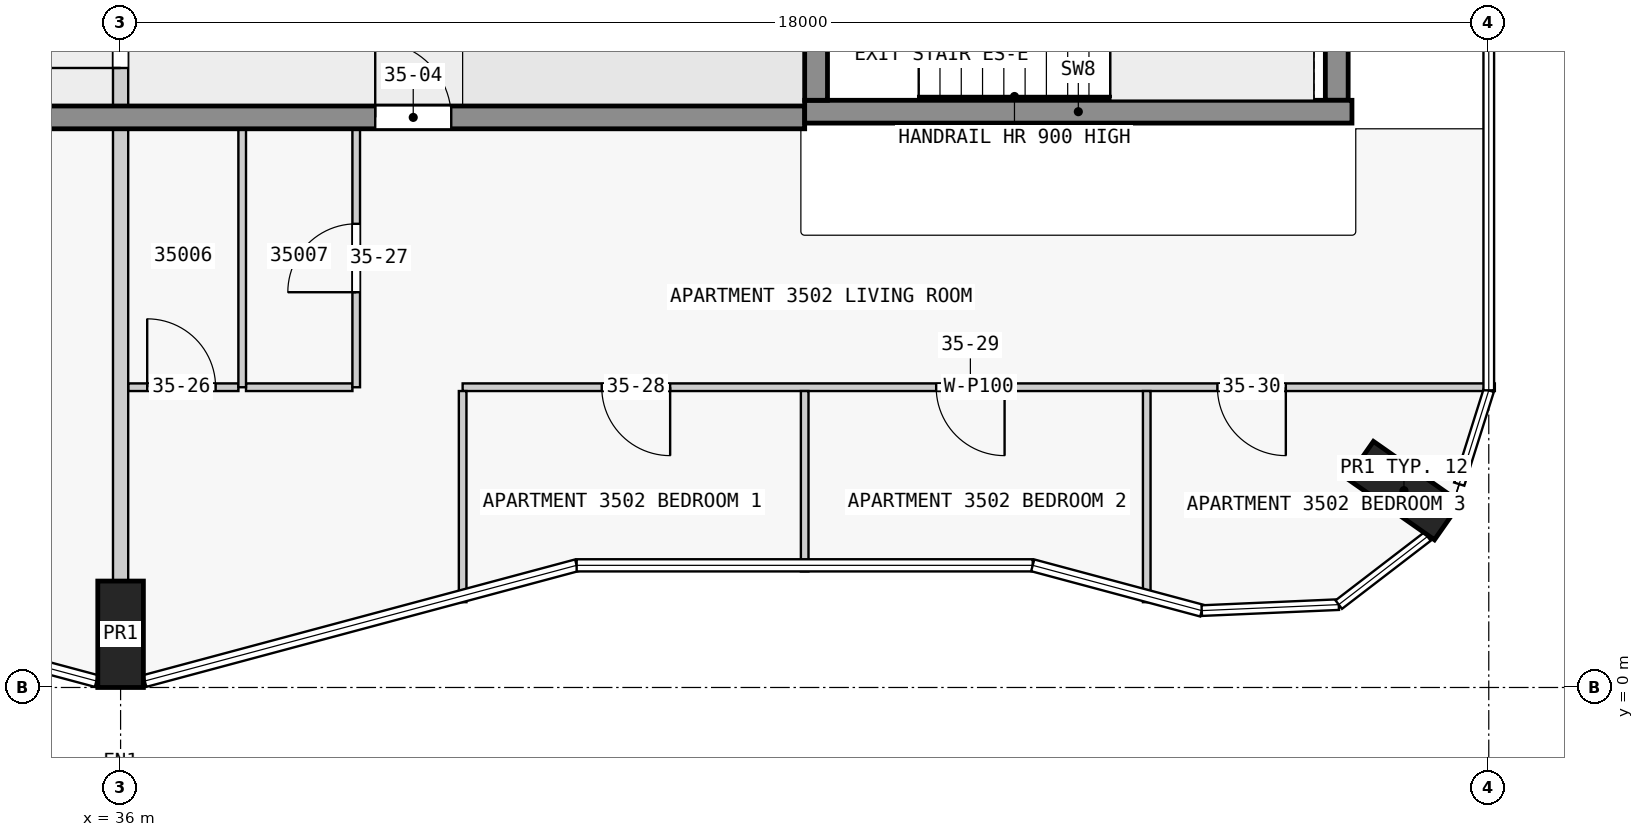
"""IFC4 building model, lengths in metres.
Left out: names, types, materials, properties, quantities, classifications, styles, units other than length and angle.
Written with IfcOpenShell. Run it as: python <this file> out.ifc"""

import sys

from ifc_helpers import new_model, si_unit, direction, frame, frame_2d, origin, origin_2d, place, context, subcontext, project, spatial, rectangle, extrude, element, fill, save


model = new_model("IFC4")
c1 = context("Model", 3, precision=1e-05, world=origin(), true_north=direction((0.0, 1.0)))
c2 = subcontext(c1, "Body", "Model", "MODEL_VIEW")
j1 = project(units=[si_unit("LENGTHUNIT", "METRE"), si_unit("PLANEANGLEUNIT", "RADIAN")], contexts=[c1])
p1 = place(None, origin())
s1 = spatial("IfcSite", under=j1, at=p1, CompositionType="ELEMENT")
p2 = place(p1, origin())
s2 = spatial("IfcBuilding", under=s1, at=p2, CompositionType="ELEMENT")
p3 = place(p2, frame((0.0, 0.0, 139.4)))
s3 = spatial("IfcBuildingStorey", under=s2, at=p3, CompositionType="ELEMENT", Elevation=139.4)
for number, where, z_axis, x_axis in (
    (1, (36.0, 0.7, 0.0), (0.0, 0.0, 1.0), (1.0, 0.0, 0.0)),
    (2, (52.884, 2.59, 0.0), (0.0, 0.0, 1.0), (0.574, 0.819, 0.0)),
):
    element("IfcColumn", number, at=place(p3, frame(where, z_axis=z_axis, x_axis=x_axis)), inside=s3, PredefinedType="COLUMN", context=c2, shape_type="SweptSolid", body=[
        extrude(rectangle(XDim=0.6, YDim=1.4, at=origin_2d()), origin(), (0.0, 0.0, 1.0), 3.5),
    ])
p4 = place(p3, frame((45.15, 7.725, 0.0), z_axis=(0.0, 0.0, 1.0), x_axis=(0.0, 1.0, 0.0)))
e3 = element("IfcWall", 3, at=p4, inside=s3, PredefinedType="SHEAR", context=c2, shape_type="SweptSolid", body=[
    extrude(rectangle(XDim=2.55, YDim=0.3, at=frame_2d((1.275, 0.0))), origin(), (0.0, 0.0, 1.0), 3.5),
])
p5 = place(p4, frame((0.725, 0.0, 0.0)))
e4 = element("IfcOpeningElement", 4, at=p5, cuts=e3, PredefinedType="OPENING", context=c2, shape_type="SweptSolid", body=[
    extrude(rectangle(XDim=1.1, YDim=2.1, at=frame_2d((0.55, 1.05))), frame((0.0, 0.16, 0.0), z_axis=(0.0, -1.0, 0.0), x_axis=(1.0, 0.0, 0.0)), (0.0, 0.0, 1.0), 0.32),
])
p6 = place(p3, frame((52.0, 7.725, 0.0), z_axis=(0.0, 0.0, 1.0), x_axis=(0.0, 1.0, 0.0)))
e5 = element("IfcWall", 5, at=p6, inside=s3, PredefinedType="SHEAR", context=c2, shape_type="SweptSolid", body=[
    extrude(rectangle(XDim=2.55, YDim=0.3, at=frame_2d((1.275, 0.0))), origin(), (0.0, 0.0, 1.0), 3.5),
])
p7 = place(p3, frame((45.0, 7.575, 0.0), z_axis=(0.0, 0.0, 1.0), x_axis=(1.0, 0.0, 0.0)))
e6 = element("IfcWall", 6, at=p7, inside=s3, PredefinedType="SHEAR", context=c2, shape_type="SweptSolid", body=[
    extrude(rectangle(XDim=7.2, YDim=0.3, at=frame_2d((3.6, 0.0))), origin(), (0.0, 0.0, 1.0), 3.5),
])
p8 = place(p3, frame((22.5, 7.5, 0.0), z_axis=(0.0, 0.0, 1.0), x_axis=(1.0, 0.0, 0.0)))
e7 = element("IfcWall", 7, at=p8, inside=s3, PredefinedType="SHEAR", context=c2, shape_type="SweptSolid", body=[
    extrude(rectangle(XDim=22.5, YDim=0.3, at=frame_2d((11.25, 0.0))), origin(), (0.0, 0.0, 1.0), 3.25),
])
p9 = place(p8, frame((1.75, 0.0, 0.0)))
e8 = element("IfcOpeningElement", 8, at=p9, cuts=e7, PredefinedType="OPENING", context=c2, shape_type="SweptSolid", body=[
    extrude(rectangle(XDim=1.0, YDim=2.1, at=frame_2d((0.5, 1.05))), frame((0.0, 0.16, 0.0), z_axis=(0.0, -1.0, 0.0), x_axis=(1.0, 0.0, 0.0)), (0.0, 0.0, 1.0), 0.32),
])
p10 = place(p8, frame((6.25, 0.0, 0.0)))
e9 = element("IfcOpeningElement", 9, at=p10, cuts=e7, PredefinedType="OPENING", context=c2, shape_type="SweptSolid", body=[
    extrude(rectangle(XDim=1.0, YDim=2.1, at=frame_2d((0.5, 1.05))), frame((0.0, 0.16, 0.0), z_axis=(0.0, -1.0, 0.0), x_axis=(1.0, 0.0, 0.0)), (0.0, 0.0, 1.0), 0.32),
])
p11 = place(p8, frame((10.35, 0.0, 0.0)))
e10 = element("IfcOpeningElement", 10, at=p11, cuts=e7, PredefinedType="OPENING", context=c2, shape_type="SweptSolid", body=[
    extrude(rectangle(XDim=1.8, YDim=2.1, at=frame_2d((0.9, 1.05))), frame((0.0, 0.16, 0.0), z_axis=(0.0, -1.0, 0.0), x_axis=(1.0, 0.0, 0.0)), (0.0, 0.0, 1.0), 0.32),
])
p12 = place(p8, frame((16.85, 0.0, 0.0)))
e11 = element("IfcOpeningElement", 11, at=p12, cuts=e7, PredefinedType="OPENING", context=c2, shape_type="SweptSolid", body=[
    extrude(rectangle(XDim=1.0, YDim=2.1, at=frame_2d((0.5, 1.05))), frame((0.0, 0.16, 0.0), z_axis=(0.0, -1.0, 0.0), x_axis=(1.0, 0.0, 0.0)), (0.0, 0.0, 1.0), 0.32),
])
p13 = place(p3, frame((54.08, 3.95, 0.0), z_axis=(0.0, 0.0, 1.0), x_axis=(-1.0, 0.0, 0.0)))
e12 = element("IfcWall", 12, at=p13, inside=s3, PredefinedType="PARTITIONING", context=c2, shape_type="SweptSolid", body=[
    extrude(rectangle(XDim=13.58, YDim=0.1, at=frame_2d((6.79, 0.0))), origin(), (0.0, 0.0, 1.0), 3.25),
])
p14 = place(p13, frame((10.85, 0.0, 0.0)))
e13 = element("IfcOpeningElement", 13, at=p14, cuts=e12, PredefinedType="OPENING", context=c2, shape_type="SweptSolid", body=[
    extrude(rectangle(XDim=0.9, YDim=2.1, at=frame_2d((0.45, 1.05))), frame((0.0, 0.06, 0.0), z_axis=(0.0, -1.0, 0.0), x_axis=(1.0, 0.0, 0.0)), (0.0, 0.0, 1.0), 0.12),
])
p15 = place(p13, frame((6.45, 0.0, 0.0)))
e14 = element("IfcOpeningElement", 14, at=p15, cuts=e12, PredefinedType="OPENING", context=c2, shape_type="SweptSolid", body=[
    extrude(rectangle(XDim=0.9, YDim=2.1, at=frame_2d((0.45, 1.05))), frame((0.0, 0.06, 0.0), z_axis=(0.0, -1.0, 0.0), x_axis=(1.0, 0.0, 0.0)), (0.0, 0.0, 1.0), 0.12),
])
p16 = place(p13, frame((2.75, 0.0, 0.0)))
e15 = element("IfcOpeningElement", 15, at=p16, cuts=e12, PredefinedType="OPENING", context=c2, shape_type="SweptSolid", body=[
    extrude(rectangle(XDim=0.9, YDim=2.1, at=frame_2d((0.45, 1.05))), frame((0.0, 0.06, 0.0), z_axis=(0.0, -1.0, 0.0), x_axis=(1.0, 0.0, 0.0)), (0.0, 0.0, 1.0), 0.12),
])
p17 = place(p3, frame((36.1, 3.95, 0.0), z_axis=(0.0, 0.0, 1.0), x_axis=(1.0, 0.0, 0.0)))
e16 = element("IfcWall", 16, at=p17, inside=s3, PredefinedType="PARTITIONING", context=c2, shape_type="SweptSolid", body=[
    extrude(rectangle(XDim=1.45, YDim=0.1, at=frame_2d((0.725, 0.0))), origin(), (0.0, 0.0, 1.0), 3.25),
])
p18 = place(p17, frame((0.25, 0.0, 0.0)))
e17 = element("IfcOpeningElement", 17, at=p18, cuts=e16, PredefinedType="OPENING", context=c2, shape_type="SweptSolid", body=[
    extrude(rectangle(XDim=0.9, YDim=2.1, at=frame_2d((0.45, 1.05))), frame((0.0, 0.06, 0.0), z_axis=(0.0, -1.0, 0.0), x_axis=(1.0, 0.0, 0.0)), (0.0, 0.0, 1.0), 0.12),
])
p19 = place(p3, frame((37.65, 3.95, 0.0), z_axis=(0.0, 0.0, 1.0), x_axis=(1.0, 0.0, 0.0)))
e18 = element("IfcWall", 18, at=p19, inside=s3, PredefinedType="PARTITIONING", context=c2, shape_type="SweptSolid", body=[
    extrude(rectangle(XDim=1.4, YDim=0.1, at=frame_2d((0.7, 0.0))), origin(), (0.0, 0.0, 1.0), 3.25),
])
p20 = place(p3, frame((36.0, 1.4, 0.0), z_axis=(0.0, 0.0, 1.0), x_axis=(0.0, 1.0, 0.0)))
e19 = element("IfcWall", 19, at=p20, inside=s3, PredefinedType="PARTITIONING", context=c2, shape_type="SweptSolid", body=[
    extrude(rectangle(XDim=5.95, YDim=0.2, at=frame_2d((2.975, 0.0))), origin(), (0.0, 0.0, 1.0), 3.25),
])
p21 = place(p3, frame((37.6, 3.95, 0.0), z_axis=(0.0, 0.0, 1.0), x_axis=(0.0, 1.0, 0.0)))
e20 = element("IfcWall", 20, at=p21, inside=s3, PredefinedType="PARTITIONING", context=c2, shape_type="SweptSolid", body=[
    extrude(rectangle(XDim=3.4, YDim=0.1, at=frame_2d((1.7, 0.0))), origin(), (0.0, 0.0, 1.0), 3.25),
])
p22 = place(p3, frame((39.1, 3.95, 0.0), z_axis=(0.0, 0.0, 1.0), x_axis=(0.0, 1.0, 0.0)))
e21 = element("IfcWall", 21, at=p22, inside=s3, PredefinedType="PARTITIONING", context=c2, shape_type="SweptSolid", body=[
    extrude(rectangle(XDim=3.4, YDim=0.1, at=frame_2d((1.7, 0.0))), origin(), (0.0, 0.0, 1.0), 3.25),
])
p23 = place(p22, frame((1.25, 0.0, 0.0)))
e22 = element("IfcOpeningElement", 22, at=p23, cuts=e21, PredefinedType="OPENING", context=c2, shape_type="SweptSolid", body=[
    extrude(rectangle(XDim=0.9, YDim=2.1, at=frame_2d((0.45, 1.05))), frame((0.0, 0.06, 0.0), z_axis=(0.0, -1.0, 0.0), x_axis=(1.0, 0.0, 0.0)), (0.0, 0.0, 1.0), 0.12),
])
p24 = place(p3, frame((40.5, 3.9, 0.0), z_axis=(0.0, 0.0, 1.0), x_axis=(0.0, -1.0, 0.0)))
e23 = element("IfcWall", 23, at=p24, inside=s3, PredefinedType="PARTITIONING", context=c2, shape_type="SweptSolid", body=[
    extrude(rectangle(XDim=2.778, YDim=0.1, at=frame_2d((1.389, 0.0))), origin(), (0.0, 0.0, 1.0), 3.25),
])
p25 = place(p3, frame((45.0, 1.527, 0.0), z_axis=(0.0, 0.0, 1.0), x_axis=(0.0, 1.0, 0.0)))
e24 = element("IfcWall", 24, at=p25, inside=s3, PredefinedType="PARTITIONING", context=c2, shape_type="SweptSolid", body=[
    extrude(rectangle(XDim=2.373, YDim=0.1, at=frame_2d((1.187, 0.0))), origin(), (0.0, 0.0, 1.0), 3.25),
])
p26 = place(p3, frame((49.5, 1.122, 0.0), z_axis=(0.0, 0.0, 1.0), x_axis=(0.0, 1.0, 0.0)))
e25 = element("IfcWall", 25, at=p26, inside=s3, PredefinedType="PARTITIONING", context=c2, shape_type="SweptSolid", body=[
    extrude(rectangle(XDim=2.778, YDim=0.1, at=frame_2d((1.389, 0.0))), origin(), (0.0, 0.0, 1.0), 3.25),
])
p27 = place(p3, frame((36.0, 7.45, 0.0), z_axis=(0.0, 0.0, 1.0), x_axis=(0.0, 1.0, 0.0)))
e26 = element("IfcWall", 26, at=p27, inside=s3, PredefinedType="PARTITIONING", context=c2, shape_type="SweptSolid", body=[
    extrude(rectangle(XDim=3.1, YDim=0.2, at=frame_2d((1.55, 0.0))), origin(), (0.0, 0.0, 1.0), 3.25),
])
p28 = place(p27, frame((0.7, 0.0, 0.0)))
e27 = element("IfcOpeningElement", 27, at=p28, cuts=e26, PredefinedType="OPENING", context=c2, shape_type="SweptSolid", body=[
    extrude(rectangle(XDim=1.8, YDim=2.1, at=frame_2d((0.9, 1.05))), frame((0.0, 0.11, 0.0), z_axis=(0.0, -1.0, 0.0), x_axis=(1.0, 0.0, 0.0)), (0.0, 0.0, 1.0), 0.22),
])
p29 = place(p12, origin())
e28 = element("IfcDoor", 28, at=p29, inside=s3, OperationType="SINGLE_SWING_RIGHT", PredefinedType="DOOR", context=c2, shape_type="SweptSolid", body=[
    extrude(rectangle(XDim=1.0, YDim=2.1, at=frame_2d((0.5, 1.05))), frame((0.0, 0.025, 0.0), z_axis=(0.0, -1.0, 0.0), x_axis=(1.0, 0.0, 0.0)), (0.0, 0.0, 1.0), 0.05),
])
fill(e11, e28)
p30 = place(p28, origin())
e29 = element("IfcDoor", 29, at=p30, inside=s3, OperationType="SINGLE_SWING_RIGHT", PredefinedType="DOOR", context=c2, shape_type="SweptSolid", body=[
    extrude(rectangle(XDim=1.8, YDim=2.1, at=frame_2d((0.9, 1.05))), frame((0.0, 0.025, 0.0), z_axis=(0.0, -1.0, 0.0), x_axis=(1.0, 0.0, 0.0)), (0.0, 0.0, 1.0), 0.05),
])
fill(e27, e29)
p31 = place(p18, origin())
e30 = element("IfcDoor", 30, at=p31, inside=s3, OperationType="SINGLE_SWING_LEFT", PredefinedType="DOOR", context=c2, shape_type="SweptSolid", body=[
    extrude(rectangle(XDim=0.9, YDim=2.1, at=frame_2d((0.45, 1.05))), frame((0.0, 0.025, 0.0), z_axis=(0.0, -1.0, 0.0), x_axis=(1.0, 0.0, 0.0)), (0.0, 0.0, 1.0), 0.05),
])
fill(e17, e30)
p32 = place(p23, origin())
e31 = element("IfcDoor", 31, at=p32, inside=s3, OperationType="SINGLE_SWING_RIGHT", PredefinedType="DOOR", context=c2, shape_type="SweptSolid", body=[
    extrude(rectangle(XDim=0.9, YDim=2.1, at=frame_2d((0.45, 1.05))), frame((0.0, 0.025, 0.0), z_axis=(0.0, -1.0, 0.0), x_axis=(1.0, 0.0, 0.0)), (0.0, 0.0, 1.0), 0.05),
])
fill(e22, e31)
p33 = place(p14, origin())
e32 = element("IfcDoor", 32, at=p33, inside=s3, OperationType="SINGLE_SWING_RIGHT", PredefinedType="DOOR", context=c2, shape_type="SweptSolid", body=[
    extrude(rectangle(XDim=0.9, YDim=2.1, at=frame_2d((0.45, 1.05))), frame((0.0, 0.025, 0.0), z_axis=(0.0, -1.0, 0.0), x_axis=(1.0, 0.0, 0.0)), (0.0, 0.0, 1.0), 0.05),
])
fill(e13, e32)
p34 = place(p15, origin())
e33 = element("IfcDoor", 33, at=p34, inside=s3, OperationType="SINGLE_SWING_RIGHT", PredefinedType="DOOR", context=c2, shape_type="SweptSolid", body=[
    extrude(rectangle(XDim=0.9, YDim=2.1, at=frame_2d((0.45, 1.05))), frame((0.0, 0.025, 0.0), z_axis=(0.0, -1.0, 0.0), x_axis=(1.0, 0.0, 0.0)), (0.0, 0.0, 1.0), 0.05),
])
fill(e14, e33)
p35 = place(p16, origin())
e34 = element("IfcDoor", 34, at=p35, inside=s3, OperationType="SINGLE_SWING_LEFT", PredefinedType="DOOR", context=c2, shape_type="SweptSolid", body=[
    extrude(rectangle(XDim=0.9, YDim=2.1, at=frame_2d((0.45, 1.05))), frame((0.0, 0.025, 0.0), z_axis=(0.0, -1.0, 0.0), x_axis=(1.0, 0.0, 0.0)), (0.0, 0.0, 1.0), 0.05),
])
fill(e15, e34)
save(model, sys.argv[1])
